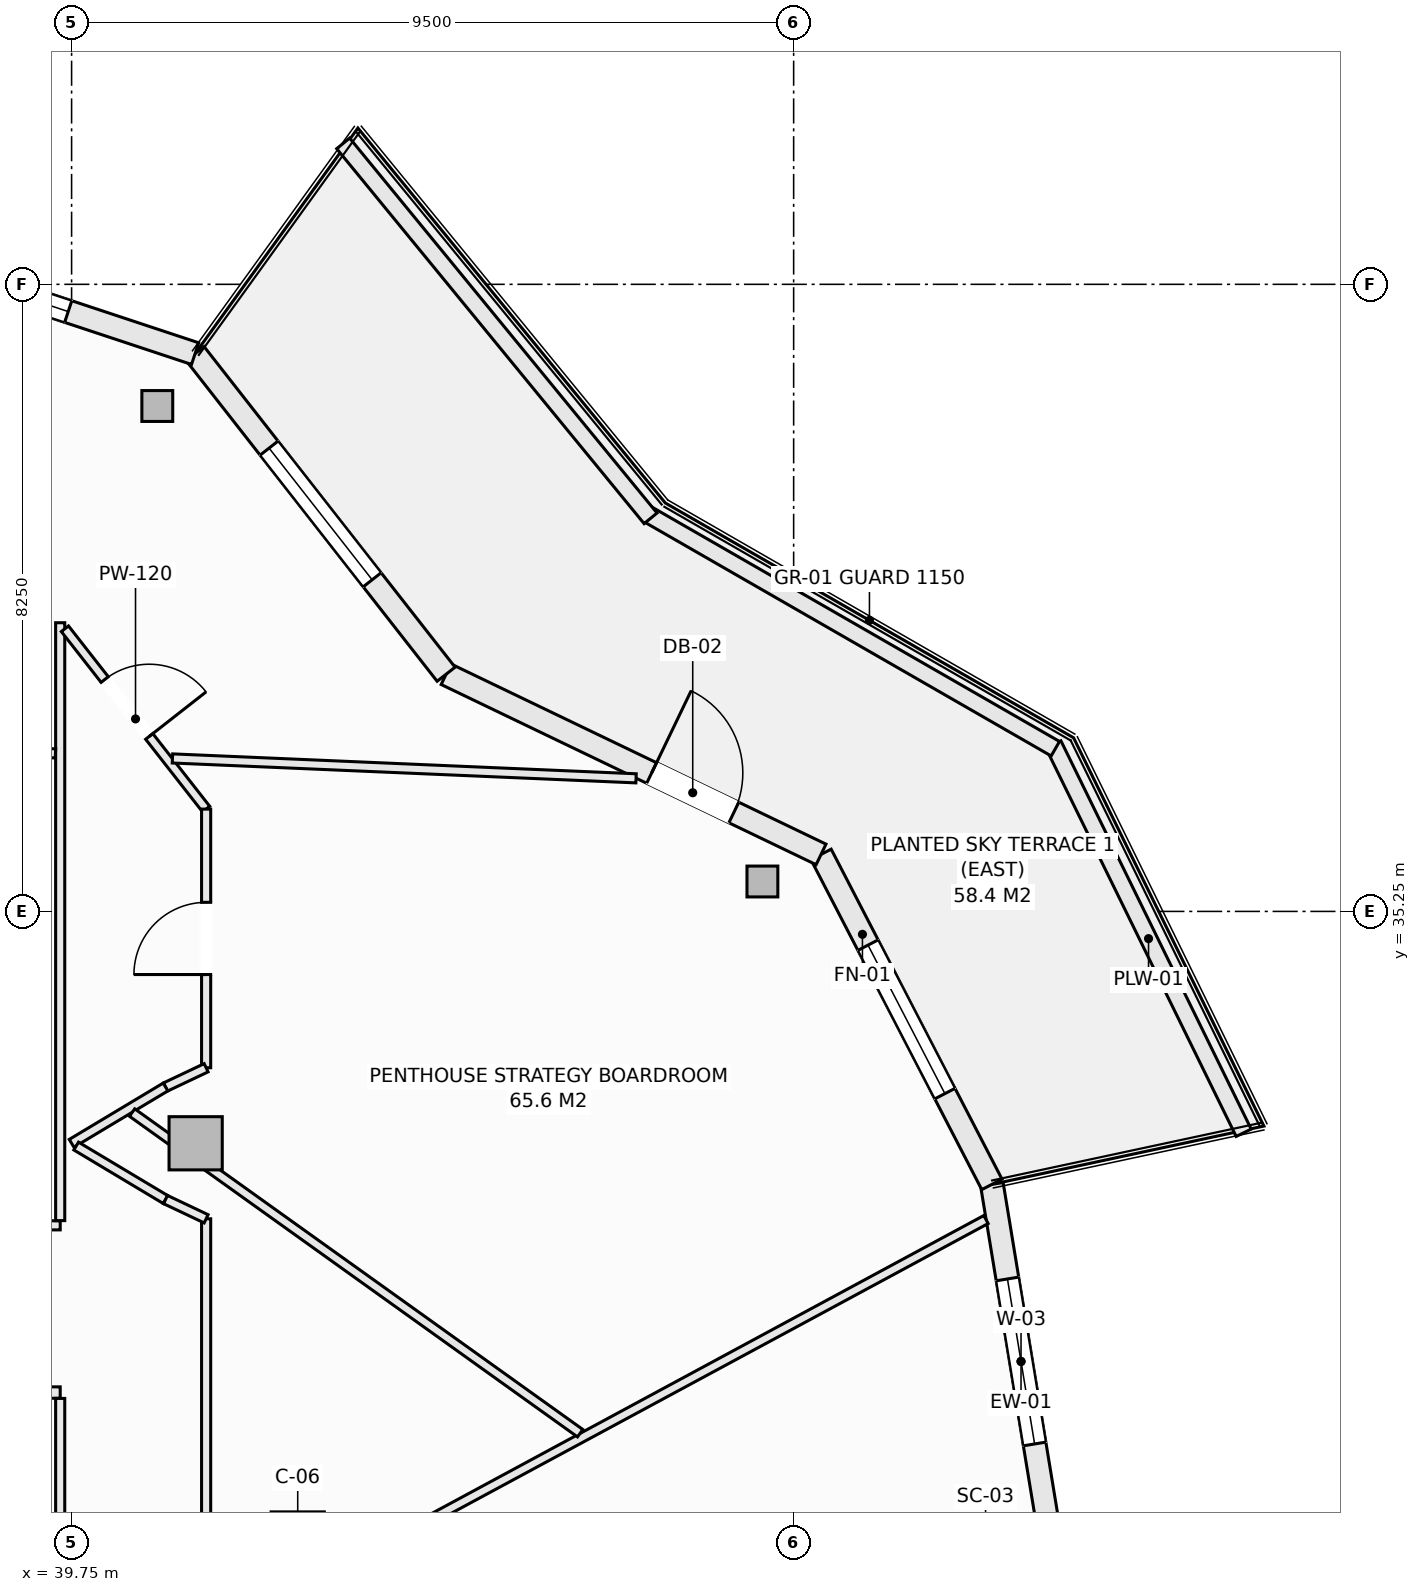
"""IFC4 building model, lengths in metres.
Left out: names, types, materials, properties, quantities, classifications, styles, units other than length and angle.
Written with IfcOpenShell. Run it as: python <this file> out.ifc"""

import sys

from ifc_helpers import new_model, si_unit, direction, frame, frame_2d, origin, origin_2d, place, context, subcontext, project, spatial, rectangle, hollow_rectangle, extrude, element, fill, save


model = new_model("IFC4")
c1 = context("Model", 3, precision=1e-05, world=origin(), true_north=direction((0.0, 1.0)))
c2 = subcontext(c1, "Body", "Model", "MODEL_VIEW")
j1 = project(units=[si_unit("LENGTHUNIT", "METRE"), si_unit("PLANEANGLEUNIT", "RADIAN")], contexts=[c1])
p1 = place(None, origin())
s1 = spatial("IfcSite", under=j1, at=p1, CompositionType="ELEMENT")
p2 = place(p1, origin())
s2 = spatial("IfcBuilding", under=s1, at=p2, CompositionType="ELEMENT")
p3 = place(p2, frame((0.0, 0.0, 252.5)))
s3 = spatial("IfcBuildingStorey", under=s2, at=p3, CompositionType="ELEMENT", Elevation=252.5)
for number, where, z_axis, x_axis in (
    (1, (48.839, 35.644, -0.27), (0.0, 0.0, 1.0), (1.0, 0.0, 0.0)),
    (2, (40.878, 41.899, -0.27), (0.0, 0.0, 1.0), (1.0, 0.0, 0.0)),
):
    element("IfcColumn", number, at=place(p3, frame(where, z_axis=z_axis, x_axis=x_axis)), inside=s3, PredefinedType="COLUMN", context=c2, shape_type="SweptSolid", body=[
        extrude(hollow_rectangle(XDim=0.406, YDim=0.406, WallThickness=0.016, at=origin_2d()), origin(), (0.0, 0.0, 1.0), 3.3),
    ])
for number, where, z_axis, x_axis in (
    (3, (42.725, 27.0, -0.27), (0.0, 0.0, 1.0), (1.0, 0.0, 0.0)),
    (4, (41.382, 32.199, -0.27), (0.0, 0.0, 1.0), (1.0, 0.0, 0.0)),
):
    element("IfcColumn", number, at=place(p3, frame(where, z_axis=z_axis, x_axis=x_axis)), inside=s3, PredefinedType="COLUMN", context=c2, shape_type="SweptSolid", body=[
        extrude(rectangle(XDim=0.7, YDim=0.7, at=origin_2d()), origin(), (0.0, 0.0, 1.0), 3.3),
    ])
p4 = place(p3, frame((51.858, 31.659, 0.0), z_axis=(0.0, 0.0, 1.0), x_axis=(0.162369371657, -0.986730047758, 0.0)))
e5 = element("IfcWall", 5, at=p4, inside=s3, PredefinedType="SOLIDWALL", context=c2, shape_type="SweptSolid", body=[
    extrude(rectangle(XDim=4.721, YDim=0.3, at=frame_2d((2.361, 0.0))), origin(), (0.0, 0.0, 1.0), 2.605),
])
p5 = place(p4, frame((1.261, 0.0, 0.72)))
e6 = element("IfcOpeningElement", 6, at=p5, cuts=e5, PredefinedType="OPENING", context=c2, shape_type="SweptSolid", body=[
    extrude(rectangle(XDim=2.2, YDim=1.65, at=frame_2d((1.1, 0.825))), frame((0.0, 0.16, 0.0), z_axis=(0.0, -1.0, 0.0), x_axis=(1.0, 0.0, 0.0)), (0.0, 0.0, 1.0), 0.32),
])
p6 = place(p3, frame((49.611, 36.0, 0.0), z_axis=(0.0, 0.0, 1.0), x_axis=(0.459793771602, -0.888025724625, 0.0)))
e7 = element("IfcWall", 7, at=p6, inside=s3, PredefinedType="SOLIDWALL", context=c2, shape_type="SweptSolid", body=[
    extrude(rectangle(XDim=4.889, YDim=0.3, at=frame_2d((2.444, 0.0))), origin(), (0.0, 0.0, 1.0), 2.605),
])
p7 = place(p6, frame((1.344, 0.0, 0.72)))
e8 = element("IfcOpeningElement", 8, at=p7, cuts=e7, PredefinedType="OPENING", context=c2, shape_type="SweptSolid", body=[
    extrude(rectangle(XDim=2.2, YDim=1.65, at=frame_2d((1.1, 0.825))), frame((0.0, 0.16, 0.0), z_axis=(0.0, -1.0, 0.0), x_axis=(1.0, 0.0, 0.0)), (0.0, 0.0, 1.0), 0.32),
])
p8 = place(p3, frame((44.677, 38.37, 0.0), z_axis=(0.0, 0.0, 1.0), x_axis=(0.901355238351, -0.433080517106, 0.0)))
e9 = element("IfcWall", 9, at=p8, inside=s3, PredefinedType="SOLIDWALL", context=c2, shape_type="SweptSolid", body=[
    extrude(rectangle(XDim=5.473, YDim=0.3, at=frame_2d((2.737, 0.0))), origin(), (0.0, 0.0, 1.0), 2.605),
])
p9 = place(p8, frame((3.0, 0.0, 0.0)))
e10 = element("IfcOpeningElement", 10, at=p9, cuts=e9, PredefinedType="OPENING", context=c2, shape_type="SweptSolid", body=[
    extrude(rectangle(XDim=1.2, YDim=2.2, at=frame_2d((0.6, 1.1))), frame((0.0, 0.16, 0.0), z_axis=(0.0, -1.0, 0.0), x_axis=(1.0, 0.0, 0.0)), (0.0, 0.0, 1.0), 0.32),
])
p10 = place(p3, frame((41.375, 42.588, 0.0), z_axis=(0.0, 0.0, 1.0), x_axis=(0.61644588519, -0.787397276241, 0.0)))
e11 = element("IfcWall", 11, at=p10, inside=s3, PredefinedType="SOLIDWALL", context=c2, shape_type="SweptSolid", body=[
    extrude(rectangle(XDim=5.357, YDim=0.3, at=frame_2d((2.678, 0.0))), origin(), (0.0, 0.0, 1.0), 2.605),
])
p11 = place(p10, frame((1.579, 0.0, 0.72)))
e12 = element("IfcOpeningElement", 12, at=p11, cuts=e11, PredefinedType="OPENING", context=c2, shape_type="SweptSolid", body=[
    extrude(rectangle(XDim=2.2, YDim=1.65, at=frame_2d((1.1, 0.825))), frame((0.0, 0.16, 0.0), z_axis=(0.0, -1.0, 0.0), x_axis=(1.0, 0.0, 0.0)), (0.0, 0.0, 1.0), 0.32),
])
p12 = place(p3, frame((35.948, 44.387, 0.0), z_axis=(0.0, 0.0, 1.0), x_axis=(0.949232769585, -0.314574552605, 0.0)))
e13 = element("IfcWall", 13, at=p12, inside=s3, PredefinedType="SOLIDWALL", context=c2, shape_type="SweptSolid", body=[
    extrude(rectangle(XDim=5.717, YDim=0.3, at=frame_2d((2.858, 0.0))), origin(), (0.0, 0.0, 1.0), 2.605),
])
p13 = place(p12, frame((1.758, 0.0, 0.72)))
e14 = element("IfcOpeningElement", 14, at=p13, cuts=e13, PredefinedType="OPENING", context=c2, shape_type="SweptSolid", body=[
    extrude(rectangle(XDim=2.2, YDim=1.65, at=frame_2d((1.1, 0.825))), frame((0.0, 0.16, 0.0), z_axis=(0.0, -1.0, 0.0), x_axis=(1.0, 0.0, 0.0)), (0.0, 0.0, 1.0), 0.32),
])
p14 = place(p3, frame((52.667, 37.447, 0.0), z_axis=(0.0, 0.0, 1.0), x_axis=(0.440058847499, -0.897968936399, 0.0)))
e15 = element("IfcWall", 15, at=p14, inside=s3, PredefinedType="PARAPET", context=c2, shape_type="SweptSolid", body=[
    extrude(rectangle(XDim=5.689, YDim=0.22, at=frame_2d((2.845, 0.0))), origin(), (0.0, 0.0, 1.0), 0.52),
])
p15 = place(p3, frame((47.321, 40.479, 0.0), z_axis=(0.0, 0.0, 1.0), x_axis=(0.866901621005, -0.49847926687, 0.0)))
e16 = element("IfcWall", 16, at=p15, inside=s3, PredefinedType="PARAPET", context=c2, shape_type="SweptSolid", body=[
    extrude(rectangle(XDim=6.197, YDim=0.22, at=frame_2d((3.098, 0.0))), origin(), (0.0, 0.0, 1.0), 0.52),
])
p16 = place(p3, frame((43.323, 45.354, 0.0), z_axis=(0.0, 0.0, 1.0), x_axis=(0.63407318032, -0.77327304492, 0.0)))
e17 = element("IfcWall", 17, at=p16, inside=s3, PredefinedType="PARAPET", context=c2, shape_type="SweptSolid", body=[
    extrude(rectangle(XDim=6.379, YDim=0.22, at=frame_2d((3.189, 0.0))), origin(), (0.0, 0.0, 1.0), 0.52),
])
p17 = place(p3, frame((30.077, 28.92, 0.0), z_axis=(0.0, 0.0, 1.0), x_axis=(1.0, 0.0, 0.0)))
e18 = element("IfcWall", 18, at=p17, inside=s3, PredefinedType="PARTITIONING", context=c2, shape_type="SweptSolid", body=[
    extrude(rectangle(XDim=9.523, YDim=0.15, at=frame_2d((4.762, 0.0))), origin(), (0.0, 0.0, 1.0), 3.03),
])
p18 = place(p3, frame((38.862, 31.12, 0.0), z_axis=(0.0, 0.0, 1.0), x_axis=(1.0, 0.0, 0.0)))
e19 = element("IfcWall", 19, at=p18, inside=s3, PredefinedType="PARTITIONING", context=c2, shape_type="SweptSolid", body=[
    extrude(rectangle(XDim=0.738, YDim=0.12, at=frame_2d((0.369, 0.0))), origin(), (0.0, 0.0, 1.0), 3.03),
])
p19 = place(p3, frame((39.6, 25.197, 0.0), z_axis=(0.0, 0.0, 1.0), x_axis=(0.0, 1.0, 0.0)))
e20 = element("IfcWall", 20, at=p19, inside=s3, PredefinedType="PARTITIONING", context=c2, shape_type="SweptSolid", body=[
    extrude(rectangle(XDim=3.646, YDim=0.12, at=frame_2d((1.823, 0.0))), origin(), (0.0, 0.0, 1.0), 3.03),
])
p20 = place(p3, frame((39.6, 31.182, 0.0), z_axis=(0.0, 0.0, 1.0), x_axis=(0.0, 1.0, 0.0)))
e21 = element("IfcWall", 21, at=p20, inside=s3, PredefinedType="PARTITIONING", context=c2, shape_type="SweptSolid", body=[
    extrude(rectangle(XDim=7.866, YDim=0.12, at=frame_2d((3.933, 0.0))), origin(), (0.0, 0.0, 1.0), 3.03),
])
p21 = place(p3, frame((39.662, 38.969, 0.0), z_axis=(0.0, 0.0, 1.0), x_axis=(0.616500468458, -0.787354540465, 0.0)))
e22 = element("IfcWall", 22, at=p21, inside=s3, PredefinedType="PARTITIONING", context=c2, shape_type="SweptSolid", body=[
    extrude(rectangle(XDim=3.014, YDim=0.12, at=frame_2d((1.507, 0.0))), origin(), (0.0, 0.0, 1.0), 3.03),
])
p22 = place(p21, frame((0.849, 0.0, 0.0)))
e23 = element("IfcOpeningElement", 23, at=p22, cuts=e22, PredefinedType="OPENING", context=c2, shape_type="SweptSolid", body=[
    extrude(rectangle(XDim=0.95, YDim=2.1, at=frame_2d((0.475, 1.05))), frame((0.0, 0.07, 0.0), z_axis=(0.0, -1.0, 0.0), x_axis=(1.0, 0.0, 0.0)), (0.0, 0.0, 1.0), 0.14),
])
p23 = place(p3, frame((41.52, 22.794, 0.0), z_axis=(0.0, 0.0, 1.0), x_axis=(0.0, 1.0, 0.0)))
e24 = element("IfcWall", 24, at=p23, inside=s3, PredefinedType="PARTITIONING", context=c2, shape_type="SweptSolid", body=[
    extrude(rectangle(XDim=8.412, YDim=0.12, at=frame_2d((4.206, 0.0))), origin(), (0.0, 0.0, 1.0), 2.478),
])
p24 = place(p3, frame((41.52, 33.193, 0.0), z_axis=(0.0, 0.0, 1.0), x_axis=(0.0, 1.0, 0.0)))
e25 = element("IfcWall", 25, at=p24, inside=s3, PredefinedType="PARTITIONING", context=c2, shape_type="SweptSolid", body=[
    extrude(rectangle(XDim=3.403, YDim=0.12, at=frame_2d((1.701, 0.0))), origin(), (0.0, 0.0, 1.0), 3.03),
])
p25 = place(p24, frame((1.227, 0.0, 0.0)))
e26 = element("IfcOpeningElement", 26, at=p25, cuts=e25, PredefinedType="OPENING", context=c2, shape_type="SweptSolid", body=[
    extrude(rectangle(XDim=0.95, YDim=2.1, at=frame_2d((0.475, 1.05))), frame((0.0, 0.07, 0.0), z_axis=(0.0, -1.0, 0.0), x_axis=(1.0, 0.0, 0.0)), (0.0, 0.0, 1.0), 0.14),
])
p26 = place(p3, frame((40.986, 32.94, 0.0), z_axis=(0.0, 0.0, 1.0), x_axis=(0.90356951601, 0.428441512621, 0.0)))
e27 = element("IfcWall", 27, at=p26, inside=s3, PredefinedType="PARTITIONING", context=c2, shape_type="SweptSolid", body=[
    extrude(rectangle(XDim=0.591, YDim=0.12, at=frame_2d((0.295, 0.0))), origin(), (0.0, 0.0, 1.0), 3.03),
])
p27 = place(p3, frame((39.75, 32.199, 0.0), z_axis=(0.0, 0.0, 1.0), x_axis=(0.857702120906, 0.514146935996, 0.0)))
e28 = element("IfcWall", 28, at=p27, inside=s3, PredefinedType="PARTITIONING", context=c2, shape_type="SweptSolid", body=[
    extrude(rectangle(XDim=1.441, YDim=0.12, at=frame_2d((0.721, 0.0))), origin(), (0.0, 0.0, 1.0), 3.03),
])
p28 = place(p3, frame((39.81, 32.163, 0.0), z_axis=(0.0, 0.0, 1.0), x_axis=(0.858011245414, -0.513630901273, 0.0)))
e29 = element("IfcWall", 29, at=p28, inside=s3, PredefinedType="PARTITIONING", context=c2, shape_type="SweptSolid", body=[
    extrude(rectangle(XDim=1.37, YDim=0.12, at=frame_2d((0.685, 0.0))), origin(), (0.0, 0.0, 1.0), 3.03),
])
p29 = place(p3, frame((40.986, 31.459, 0.0), z_axis=(0.0, 0.0, 1.0), x_axis=(0.903729424576, -0.428104107847, 0.0)))
e30 = element("IfcWall", 30, at=p29, inside=s3, PredefinedType="PARTITIONING", context=c2, shape_type="SweptSolid", body=[
    extrude(rectangle(XDim=0.591, YDim=0.12, at=frame_2d((0.295, 0.0))), origin(), (0.0, 0.0, 1.0), 3.03),
])
p30 = place(p3, frame((41.582, 25.693, 0.0), z_axis=(0.0, 0.0, 1.0), x_axis=(0.880032375067, 0.474913696195, 0.0)))
e31 = element("IfcWall", 31, at=p30, inside=s3, PredefinedType="PARTITIONING", context=c2, shape_type="SweptSolid", body=[
    extrude(rectangle(XDim=11.589, YDim=0.12, at=frame_2d((5.794, 0.0))), origin(), (0.0, 0.0, 1.0), 2.478),
])
p31 = place(p3, frame((40.546, 32.604, 0.0), z_axis=(0.0, 0.0, 1.0), x_axis=(0.813264440548, -0.581894277116, 0.0)))
e32 = element("IfcWall", 32, at=p31, inside=s3, PredefinedType="PARTITIONING", context=c2, shape_type="SweptSolid", body=[
    extrude(rectangle(XDim=7.249, YDim=0.12, at=frame_2d((3.625, 0.0))), origin(), (0.0, 0.0, 1.0), 3.03),
])
p32 = place(p3, frame((33.699, 37.579, 0.0), z_axis=(0.0, 0.0, 1.0), x_axis=(0.999081056781, -0.042860727724, 0.0)))
e33 = element("IfcWall", 33, at=p32, inside=s3, PredefinedType="PARTITIONING", context=c2, shape_type="SweptSolid", body=[
    extrude(rectangle(XDim=5.844, YDim=0.12, at=frame_2d((2.922, 0.0))), origin(), (0.0, 0.0, 1.0), 2.478),
])
p33 = place(p3, frame((41.077, 37.262, 0.0), z_axis=(0.0, 0.0, 1.0), x_axis=(0.999080744008, -0.042868017834, 0.0)))
e34 = element("IfcWall", 34, at=p33, inside=s3, PredefinedType="PARTITIONING", context=c2, shape_type="SweptSolid", body=[
    extrude(rectangle(XDim=6.105, YDim=0.12, at=frame_2d((3.053, 0.0))), origin(), (0.0, 0.0, 1.0), 2.605),
])
p34 = place(p5, origin())
e35 = element("IfcWindow", 35, at=p34, inside=s3, PartitioningType="SINGLE_PANEL", PredefinedType="WINDOW", context=c2, shape_type="SweptSolid", body=[
    extrude(rectangle(XDim=2.2, YDim=1.65, at=frame_2d((1.1, 0.825))), frame((0.0, 0.03, 0.0), z_axis=(0.0, -1.0, 0.0), x_axis=(1.0, 0.0, 0.0)), (0.0, 0.0, 1.0), 0.06),
])
fill(e6, e35)
p35 = place(p7, origin())
e36 = element("IfcWindow", 36, at=p35, inside=s3, PartitioningType="SINGLE_PANEL", PredefinedType="WINDOW", context=c2, shape_type="SweptSolid", body=[
    extrude(rectangle(XDim=2.2, YDim=1.65, at=frame_2d((1.1, 0.825))), frame((0.0, 0.03, 0.0), z_axis=(0.0, -1.0, 0.0), x_axis=(1.0, 0.0, 0.0)), (0.0, 0.0, 1.0), 0.06),
])
fill(e8, e36)
p36 = place(p9, origin())
e37 = element("IfcDoor", 37, at=p36, inside=s3, OperationType="SINGLE_SWING_LEFT", PredefinedType="DOOR", context=c2, shape_type="SweptSolid", body=[
    extrude(rectangle(XDim=1.2, YDim=2.2, at=frame_2d((0.6, 1.1))), frame((0.0, 0.025, 0.0), z_axis=(0.0, -1.0, 0.0), x_axis=(1.0, 0.0, 0.0)), (0.0, 0.0, 1.0), 0.05),
])
fill(e10, e37)
p37 = place(p11, origin())
e38 = element("IfcWindow", 38, at=p37, inside=s3, PartitioningType="SINGLE_PANEL", PredefinedType="WINDOW", context=c2, shape_type="SweptSolid", body=[
    extrude(rectangle(XDim=2.2, YDim=1.65, at=frame_2d((1.1, 0.825))), frame((0.0, 0.03, 0.0), z_axis=(0.0, -1.0, 0.0), x_axis=(1.0, 0.0, 0.0)), (0.0, 0.0, 1.0), 0.06),
])
fill(e12, e38)
p38 = place(p13, origin())
e39 = element("IfcWindow", 39, at=p38, inside=s3, PartitioningType="SINGLE_PANEL", PredefinedType="WINDOW", context=c2, shape_type="SweptSolid", body=[
    extrude(rectangle(XDim=2.2, YDim=1.65, at=frame_2d((1.1, 0.825))), frame((0.0, 0.03, 0.0), z_axis=(0.0, -1.0, 0.0), x_axis=(1.0, 0.0, 0.0)), (0.0, 0.0, 1.0), 0.06),
])
fill(e14, e39)
p39 = place(p25, origin())
e40 = element("IfcDoor", 40, at=p39, inside=s3, OperationType="SINGLE_SWING_LEFT", PredefinedType="DOOR", context=c2, shape_type="SweptSolid", body=[
    extrude(rectangle(XDim=0.95, YDim=2.1, at=frame_2d((0.475, 1.05))), frame((0.0, 0.025, 0.0), z_axis=(0.0, -1.0, 0.0), x_axis=(1.0, 0.0, 0.0)), (0.0, 0.0, 1.0), 0.05),
])
fill(e26, e40)
p40 = place(p22, origin())
e41 = element("IfcDoor", 41, at=p40, inside=s3, OperationType="SINGLE_SWING_RIGHT", PredefinedType="DOOR", context=c2, shape_type="SweptSolid", body=[
    extrude(rectangle(XDim=0.95, YDim=2.1, at=frame_2d((0.475, 1.05))), frame((0.0, 0.025, 0.0), z_axis=(0.0, -1.0, 0.0), x_axis=(1.0, 0.0, 0.0)), (0.0, 0.0, 1.0), 0.05),
])
fill(e23, e41)
save(model, sys.argv[1])
